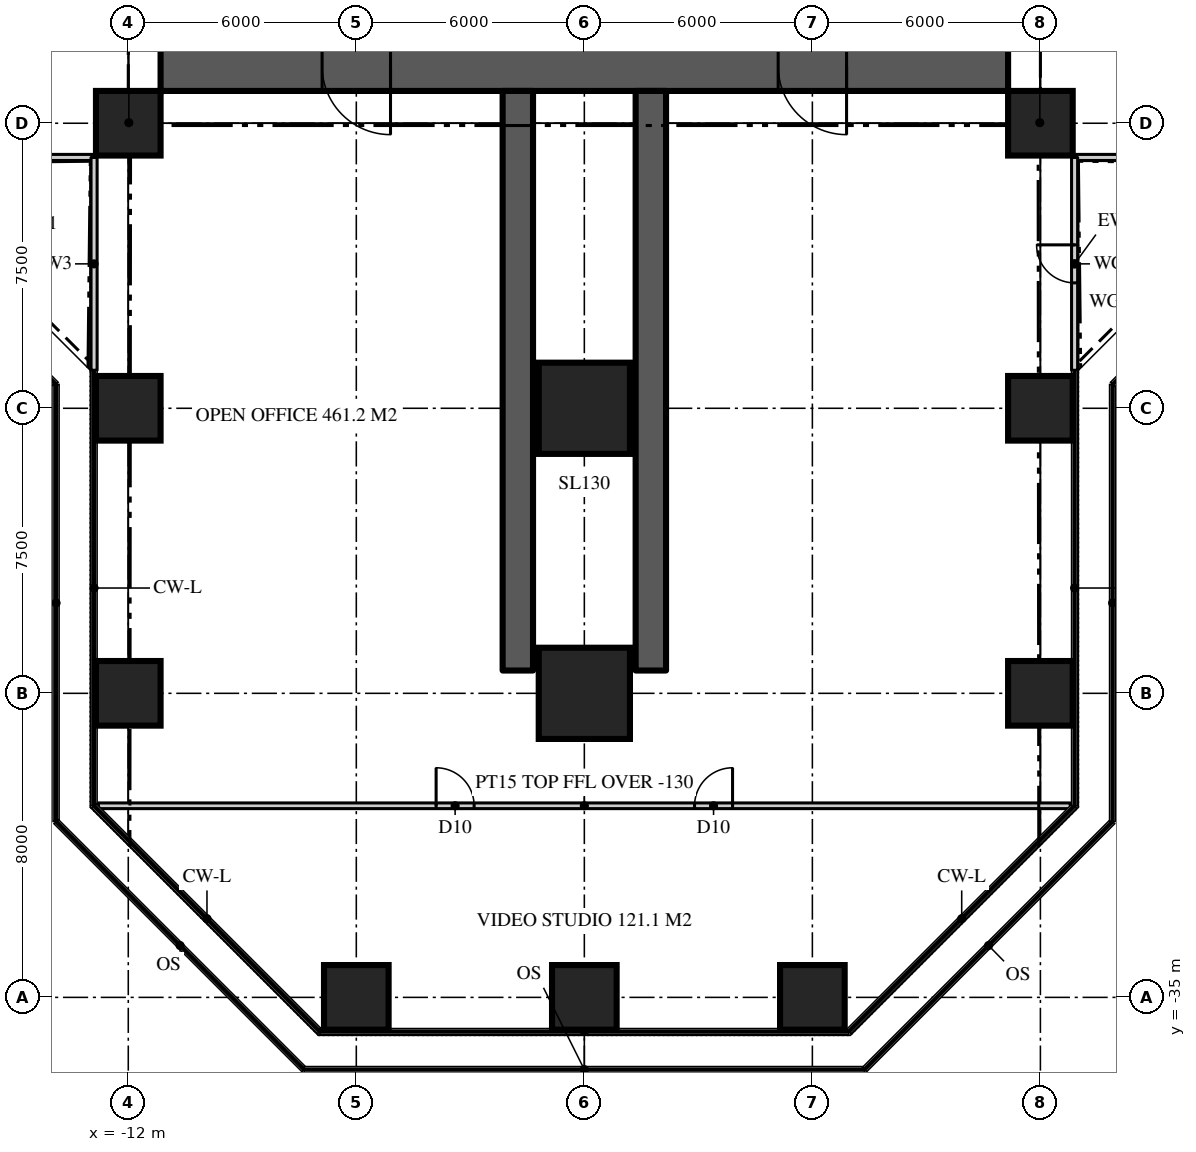
"""IFC4 building model, lengths in metres.
Left out: names, types, materials, properties, quantities, classifications, styles, units other than length and angle.
Written with IfcOpenShell. Run it as: python <this file> out.ifc"""

import sys

from ifc_helpers import new_model, si_unit, direction, frame, frame_2d, origin, origin_2d, place, context, subcontext, project, spatial, rectangle, extrude, element, fill, save


model = new_model("IFC4")
c1 = context("Model", 3, precision=1e-05, world=origin(), true_north=direction((0.0, 1.0)))
c2 = subcontext(c1, "Body", "Model", "MODEL_VIEW")
j1 = project(units=[si_unit("LENGTHUNIT", "METRE"), si_unit("PLANEANGLEUNIT", "RADIAN")], contexts=[c1])
p1 = place(None, origin())
s1 = spatial("IfcSite", under=j1, at=p1, CompositionType="ELEMENT")
p2 = place(p1, origin())
s2 = spatial("IfcBuilding", under=s1, at=p2, CompositionType="ELEMENT")
p3 = place(p2, frame((0.0, 0.0, 74.7)))
s3 = spatial("IfcBuildingStorey", under=s2, at=p3, CompositionType="ELEMENT", Elevation=74.7)
p4 = place(p3, frame((11.15, -10.5, 0.0), z_axis=(0.0, 0.0, 1.0), x_axis=(-1.0, 0.0, 0.0)))
e1 = element("IfcWall", 1, at=p4, inside=s3, PredefinedType="SHEAR", context=c2, shape_type="SweptSolid", body=[
    extrude(rectangle(XDim=22.3, YDim=1.3, at=frame_2d((11.15, 0.0))), origin(), (0.0, 0.0, 1.0), 3.9),
])
p5 = place(p4, frame((16.25, 0.0, 0.0)))
e2 = element("IfcOpeningElement", 2, at=p5, cuts=e1, PredefinedType="OPENING", context=c2, shape_type="SweptSolid", body=[
    extrude(rectangle(XDim=1.8, YDim=2.2, at=frame_2d((0.9, 1.1))), frame((0.0, 0.66, 0.0), z_axis=(0.0, -1.0, 0.0), x_axis=(1.0, 0.0, 0.0)), (0.0, 0.0, 1.0), 1.32),
])
p6 = place(p4, frame((4.25, 0.0, 0.0)))
e3 = element("IfcOpeningElement", 3, at=p6, cuts=e1, PredefinedType="OPENING", context=c2, shape_type="SweptSolid", body=[
    extrude(rectangle(XDim=1.8, YDim=2.2, at=frame_2d((0.9, 1.1))), frame((0.0, 0.66, 0.0), z_axis=(0.0, -1.0, 0.0), x_axis=(1.0, 0.0, 0.0)), (0.0, 0.0, 1.0), 1.32),
])
for number, where, z_axis, x_axis in (
    (4, (-1.75, -11.15, 0.0), (0.0, 0.0, 1.0), (0.0, -1.0, 0.0)),
    (5, (1.75, -11.15, 0.0), (0.0, 0.0, 1.0), (0.0, -1.0, 0.0)),
):
    element("IfcWall", number, at=place(p3, frame(where, z_axis=z_axis, x_axis=x_axis)), inside=s3, PredefinedType="SHEAR", context=c2, shape_type="SweptSolid", body=[
        extrude(rectangle(XDim=15.25, YDim=0.8, at=frame_2d((7.625, 0.0))), origin(), (0.0, 0.0, 1.0), 3.9),
    ])
for number, where, z_axis, x_axis in (
    (6, (-6.0, -35.0, 0.0), (0.0, 0.0, 1.0), (1.0, 0.0, 0.0)),
    (7, (0.0, -35.0, 0.0), (0.0, 0.0, 1.0), (1.0, 0.0, 0.0)),
    (8, (6.0, -35.0, 0.0), (0.0, 0.0, 1.0), (1.0, 0.0, 0.0)),
    (9, (-12.0, -27.0, 0.0), (0.0, 0.0, 1.0), (1.0, 0.0, 0.0)),
):
    element("IfcColumn", number, at=place(p3, frame(where, z_axis=z_axis, x_axis=x_axis)), inside=s3, PredefinedType="COLUMN", context=c2, shape_type="SweptSolid", body=[
        extrude(rectangle(XDim=1.7, YDim=1.7, at=origin_2d()), origin(), (0.0, 0.0, 1.0), 3.9),
    ])
p7 = place(p3, frame((0.0, -27.0, 0.0), z_axis=(0.0, 0.0, 1.0), x_axis=(1.0, 0.0, 0.0)))
e10 = element("IfcColumn", 10, at=p7, inside=s3, PredefinedType="COLUMN", context=c2, shape_type="SweptSolid", body=[
    extrude(rectangle(XDim=2.4, YDim=2.4, at=origin_2d()), origin(), (0.0, 0.0, 1.0), 3.9),
])
for number, where, z_axis, x_axis in (
    (11, (12.0, -27.0, 0.0), (0.0, 0.0, 1.0), (1.0, 0.0, 0.0)),
    (12, (-12.0, -19.5, 0.0), (0.0, 0.0, 1.0), (1.0, 0.0, 0.0)),
):
    element("IfcColumn", number, at=place(p3, frame(where, z_axis=z_axis, x_axis=x_axis)), inside=s3, PredefinedType="COLUMN", context=c2, shape_type="SweptSolid", body=[
        extrude(rectangle(XDim=1.7, YDim=1.7, at=origin_2d()), origin(), (0.0, 0.0, 1.0), 3.9),
    ])
p8 = place(p3, frame((0.0, -19.5, 0.0), z_axis=(0.0, 0.0, 1.0), x_axis=(1.0, 0.0, 0.0)))
e13 = element("IfcColumn", 13, at=p8, inside=s3, PredefinedType="COLUMN", context=c2, shape_type="SweptSolid", body=[
    extrude(rectangle(XDim=2.4, YDim=2.4, at=origin_2d()), origin(), (0.0, 0.0, 1.0), 3.9),
])
for number, where, z_axis, x_axis in (
    (14, (12.0, -19.5, 0.0), (0.0, 0.0, 1.0), (1.0, 0.0, 0.0)),
    (15, (-12.0, -12.0, 0.0), (0.0, 0.0, 1.0), (1.0, 0.0, 0.0)),
    (16, (12.0, -12.0, 0.0), (0.0, 0.0, 1.0), (1.0, 0.0, 0.0)),
):
    element("IfcColumn", number, at=place(p3, frame(where, z_axis=z_axis, x_axis=x_axis)), inside=s3, PredefinedType="COLUMN", context=c2, shape_type="SweptSolid", body=[
        extrude(rectangle(XDim=1.7, YDim=1.7, at=origin_2d()), origin(), (0.0, 0.0, 1.0), 3.9),
    ])
p9 = place(p3, frame((12.9, -12.9, 0.0), z_axis=(0.0, 0.0, 1.0), x_axis=(1.0, 0.0, 0.0)))
e17 = element("IfcWall", 17, at=p9, inside=s3, PredefinedType="SOLIDWALL", context=c2, shape_type="SweptSolid", body=[
    extrude(rectangle(XDim=5.6, YDim=0.16, at=frame_2d((2.8, 0.0))), origin(), (0.0, 0.0, 1.0), 3.77),
])
p10 = place(p3, frame((-18.5, -12.9, 0.0), z_axis=(0.0, 0.0, 1.0), x_axis=(1.0, 0.0, 0.0)))
e18 = element("IfcWall", 18, at=p10, inside=s3, PredefinedType="SOLIDWALL", context=c2, shape_type="SweptSolid", body=[
    extrude(rectangle(XDim=5.6, YDim=0.16, at=frame_2d((2.8, 0.0))), origin(), (0.0, 0.0, 1.0), 3.77),
])
p11 = place(p10, frame((2.3, 0.0, 0.0)))
e19 = element("IfcOpeningElement", 19, at=p11, cuts=e18, PredefinedType="OPENING", context=c2, shape_type="SweptSolid", body=[
    extrude(rectangle(XDim=1.0, YDim=2.2, at=frame_2d((0.5, 1.1))), frame((0.0, 0.09, 0.0), z_axis=(0.0, -1.0, 0.0), x_axis=(1.0, 0.0, 0.0)), (0.0, 0.0, 1.0), 0.18),
])
p12 = place(p3, frame((-12.9, -12.9, 0.0), z_axis=(0.0, 0.0, 1.0), x_axis=(0.0, -1.0, 0.0)))
e20 = element("IfcWall", 20, at=p12, inside=s3, PredefinedType="SOLIDWALL", context=c2, shape_type="SweptSolid", body=[
    extrude(rectangle(XDim=5.6, YDim=0.16, at=frame_2d((2.8, 0.0))), origin(), (0.0, 0.0, 1.0), 3.77),
])
p13 = place(p3, frame((12.9, -18.5, 0.0), z_axis=(0.0, 0.0, 1.0), x_axis=(0.0, 1.0, 0.0)))
e21 = element("IfcWall", 21, at=p13, inside=s3, PredefinedType="SOLIDWALL", context=c2, shape_type="SweptSolid", body=[
    extrude(rectangle(XDim=5.6, YDim=0.16, at=frame_2d((2.8, 0.0))), origin(), (0.0, 0.0, 1.0), 3.77),
])
p14 = place(p13, frame((2.3, 0.0, 0.0)))
e22 = element("IfcOpeningElement", 22, at=p14, cuts=e21, PredefinedType="OPENING", context=c2, shape_type="SweptSolid", body=[
    extrude(rectangle(XDim=1.0, YDim=2.2, at=frame_2d((0.5, 1.1))), frame((0.0, 0.09, 0.0), z_axis=(0.0, -1.0, 0.0), x_axis=(1.0, 0.0, 0.0)), (0.0, 0.0, 1.0), 0.18),
])
p15 = place(p3, frame((-12.786, -29.959, 0.0), z_axis=(0.0, 0.0, 1.0), x_axis=(1.0, 0.0, 0.0)))
e23 = element("IfcWall", 23, at=p15, inside=s3, PredefinedType="PARTITIONING", context=c2, shape_type="SweptSolid", body=[
    extrude(rectangle(XDim=25.573, YDim=0.15, at=frame_2d((12.786, 0.0))), origin(), (0.0, 0.0, 1.0), 3.77),
])
p16 = place(p15, frame((15.687, 0.0, 0.0)))
e24 = element("IfcOpeningElement", 24, at=p16, cuts=e23, PredefinedType="OPENING", context=c2, shape_type="SweptSolid", body=[
    extrude(rectangle(XDim=1.0, YDim=2.2, at=frame_2d((0.5, 1.1))), frame((0.0, 0.085, 0.0), z_axis=(0.0, -1.0, 0.0), x_axis=(1.0, 0.0, 0.0)), (0.0, 0.0, 1.0), 0.17),
])
p17 = place(p15, frame((8.886, 0.0, 0.0)))
e25 = element("IfcOpeningElement", 25, at=p17, cuts=e23, PredefinedType="OPENING", context=c2, shape_type="SweptSolid", body=[
    extrude(rectangle(XDim=1.0, YDim=2.2, at=frame_2d((0.5, 1.1))), frame((0.0, 0.085, 0.0), z_axis=(0.0, -1.0, 0.0), x_axis=(1.0, 0.0, 0.0)), (0.0, 0.0, 1.0), 0.17),
])
for number, where, z_axis, x_axis in (
    (26, (-11.15, -11.15, 0.0), (0.0, 0.0, 1.0), (-0.707, -0.707, 0.0)),
    (27, (11.15, -11.15, 0.0), (0.0, 0.0, 1.0), (0.707, -0.707, 0.0)),
):
    element("IfcWall", number, at=place(p3, frame(where, z_axis=z_axis, x_axis=x_axis)), inside=s3, PredefinedType="PARTITIONING", context=c2, shape_type="SweptSolid", body=[
        extrude(rectangle(XDim=2.362, YDim=0.15, at=frame_2d((1.181, 0.0))), origin(), (0.0, 0.0, 1.0), 3.22),
    ])
p18 = place(p14, origin())
e28 = element("IfcDoor", 28, at=p18, inside=s3, OperationType="SINGLE_SWING_RIGHT", PredefinedType="DOOR", context=c2, shape_type="SweptSolid", body=[
    extrude(rectangle(XDim=1.0, YDim=2.2, at=frame_2d((0.5, 1.1))), frame((0.0, 0.025, 0.0), z_axis=(0.0, -1.0, 0.0), x_axis=(1.0, 0.0, 0.0)), (0.0, 0.0, 1.0), 0.05),
])
fill(e22, e28)
p19 = place(p5, origin())
e29 = element("IfcDoor", 29, at=p19, inside=s3, OperationType="DOUBLE_DOOR_DOUBLE_SWING", PredefinedType="DOOR", context=c2, shape_type="SweptSolid", body=[
    extrude(rectangle(XDim=1.8, YDim=2.2, at=frame_2d((0.9, 1.1))), frame((0.0, 0.025, 0.0), z_axis=(0.0, -1.0, 0.0), x_axis=(1.0, 0.0, 0.0)), (0.0, 0.0, 1.0), 0.05),
])
fill(e2, e29)
p20 = place(p6, origin())
e30 = element("IfcDoor", 30, at=p20, inside=s3, OperationType="DOUBLE_DOOR_DOUBLE_SWING", PredefinedType="DOOR", context=c2, shape_type="SweptSolid", body=[
    extrude(rectangle(XDim=1.8, YDim=2.2, at=frame_2d((0.9, 1.1))), frame((0.0, 0.025, 0.0), z_axis=(0.0, -1.0, 0.0), x_axis=(1.0, 0.0, 0.0)), (0.0, 0.0, 1.0), 0.05),
])
fill(e3, e30)
p21 = place(p16, origin())
e31 = element("IfcDoor", 31, at=p21, inside=s3, OperationType="SINGLE_SWING_RIGHT", PredefinedType="DOOR", context=c2, shape_type="SweptSolid", body=[
    extrude(rectangle(XDim=1.0, YDim=2.2, at=frame_2d((0.5, 1.1))), frame((0.0, 0.025, 0.0), z_axis=(0.0, -1.0, 0.0), x_axis=(1.0, 0.0, 0.0)), (0.0, 0.0, 1.0), 0.05),
])
fill(e24, e31)
p22 = place(p17, origin())
e32 = element("IfcDoor", 32, at=p22, inside=s3, OperationType="SINGLE_SWING_LEFT", PredefinedType="DOOR", context=c2, shape_type="SweptSolid", body=[
    extrude(rectangle(XDim=1.0, YDim=2.2, at=frame_2d((0.5, 1.1))), frame((0.0, 0.025, 0.0), z_axis=(0.0, -1.0, 0.0), x_axis=(1.0, 0.0, 0.0)), (0.0, 0.0, 1.0), 0.05),
])
fill(e25, e32)
save(model, sys.argv[1])
